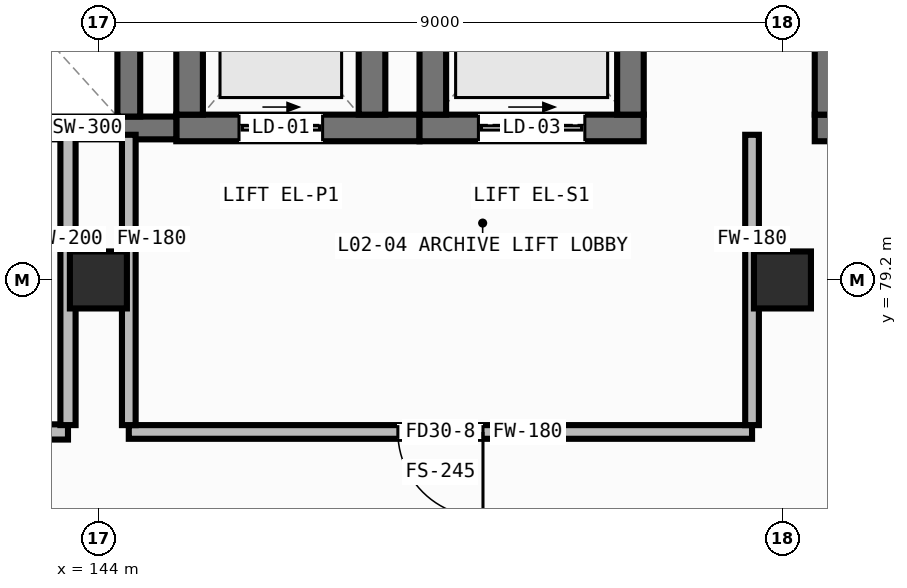
"""IFC4 building model, lengths in metres.
Left out: names, types, materials, properties, quantities, classifications, styles, units other than length and angle.
Written with IfcOpenShell. Run it as: python <this file> out.ifc"""

import sys

from ifc_helpers import new_model, si_unit, direction, frame, frame_2d, origin, origin_2d, place, context, subcontext, project, spatial, rectangle, hollow_rectangle, extrude, element, fill, save


model = new_model("IFC4")
c1 = context("Model", 3, precision=1e-05, world=origin(), true_north=direction((0.0, 1.0)))
c2 = subcontext(c1, "Body", "Model", "MODEL_VIEW")
j1 = project(units=[si_unit("LENGTHUNIT", "METRE"), si_unit("PLANEANGLEUNIT", "RADIAN")], contexts=[c1])
p1 = place(None, origin())
s1 = spatial("IfcSite", under=j1, at=p1, CompositionType="ELEMENT")
p2 = place(p1, origin())
s2 = spatial("IfcBuilding", under=s1, at=p2, CompositionType="ELEMENT")
p3 = place(p2, frame((0.0, 0.0, 4.8)))
s3 = spatial("IfcBuildingStorey", under=s2, at=p3, CompositionType="ELEMENT", Elevation=4.8)
for number, where, z_axis, x_axis in (
    (1, (144.0, 79.2, 0.0), (0.0, 0.0, 1.0), (1.0, 0.0, 0.0)),
    (2, (153.0, 79.2, 0.0), (0.0, 0.0, 1.0), (1.0, 0.0, 0.0)),
):
    element("IfcColumn", number, at=place(p3, frame(where, z_axis=z_axis, x_axis=x_axis)), inside=s3, PredefinedType="COLUMN", context=c2, shape_type="SweptSolid", body=[
        extrude(hollow_rectangle(XDim=0.75, YDim=0.75, WallThickness=0.032, at=origin_2d()), origin(), (0.0, 0.0, 1.0), 4.0),
    ])
p4 = place(p3, frame((153.425, 81.2, 0.0), z_axis=(0.0, 0.0, 1.0), x_axis=(1.0, 0.0, 0.0)))
e3 = element("IfcWall", 3, at=p4, inside=s3, PredefinedType="SHEAR", context=c2, shape_type="SweptSolid", body=[
    extrude(rectangle(XDim=8.15, YDim=0.35, at=frame_2d((4.075, 0.0))), origin(), (0.0, 0.0, 1.0), 3.755),
])
p5 = place(p4, frame((0.525, 0.0, 0.0)))
e4 = element("IfcOpeningElement", 4, at=p5, cuts=e3, PredefinedType="OPENING", context=c2, shape_type="SweptSolid", body=[
    extrude(rectangle(XDim=1.15, YDim=2.1, at=frame_2d((0.575, 1.05))), frame((0.0, 0.187, 0.0), z_axis=(0.0, -1.0, 0.0), x_axis=(1.0, 0.0, 0.0)), (0.0, 0.0, 1.0), 0.374),
])
p6 = place(p3, frame((153.6, 81.375, 0.0), z_axis=(0.0, 0.0, 1.0), x_axis=(0.0, 1.0, 0.0)))
e5 = element("IfcWall", 5, at=p6, inside=s3, PredefinedType="SHEAR", context=c2, shape_type="SweptSolid", body=[
    extrude(rectangle(XDim=3.55, YDim=0.35, at=frame_2d((1.775, 0.0))), origin(), (0.0, 0.0, 1.0), 3.755),
])
p7 = place(p3, frame((145.025, 81.2, 0.0), z_axis=(0.0, 0.0, 1.0), x_axis=(1.0, 0.0, 0.0)))
e6 = element("IfcWall", 6, at=p7, inside=s3, PredefinedType="SHEAR", context=c2, shape_type="SweptSolid", body=[
    extrude(rectangle(XDim=3.2, YDim=0.35, at=frame_2d((1.6, 0.0))), origin(), (0.0, 0.0, 1.0), 3.755),
])
p8 = place(p7, frame((0.825, 0.0, 0.0)))
e7 = element("IfcOpeningElement", 7, at=p8, cuts=e6, PredefinedType="OPENING", context=c2, shape_type="SweptSolid", body=[
    extrude(rectangle(XDim=1.1, YDim=2.1, at=frame_2d((0.55, 1.05))), frame((0.0, 0.187, 0.0), z_axis=(0.0, -1.0, 0.0), x_axis=(1.0, 0.0, 0.0)), (0.0, 0.0, 1.0), 0.374),
])
for number, where, z_axis, x_axis in (
    (8, (145.2, 81.375, 0.0), (0.0, 0.0, 1.0), (0.0, 1.0, 0.0)),
    (9, (147.6, 81.375, 0.0), (0.0, 0.0, 1.0), (0.0, 1.0, 0.0)),
):
    element("IfcWall", number, at=place(p3, frame(where, z_axis=z_axis, x_axis=x_axis)), inside=s3, PredefinedType="SHEAR", context=c2, shape_type="SweptSolid", body=[
        extrude(rectangle(XDim=2.45, YDim=0.35, at=frame_2d((1.225, 0.0))), origin(), (0.0, 0.0, 1.0), 3.755),
    ])
p9 = place(p3, frame((148.225, 81.2, 0.0), z_axis=(0.0, 0.0, 1.0), x_axis=(1.0, 0.0, 0.0)))
e10 = element("IfcWall", 10, at=p9, inside=s3, PredefinedType="SHEAR", context=c2, shape_type="SweptSolid", body=[
    extrude(rectangle(XDim=2.95, YDim=0.35, at=frame_2d((1.475, 0.0))), origin(), (0.0, 0.0, 1.0), 3.755),
])
p10 = place(p9, frame((0.775, 0.0, 0.0)))
e11 = element("IfcOpeningElement", 11, at=p10, cuts=e10, PredefinedType="OPENING", context=c2, shape_type="SweptSolid", body=[
    extrude(rectangle(XDim=1.4, YDim=2.15, at=frame_2d((0.7, 1.075))), frame((0.0, 0.187, 0.0), z_axis=(0.0, -1.0, 0.0), x_axis=(1.0, 0.0, 0.0)), (0.0, 0.0, 1.0), 0.374),
])
for number, where, z_axis, x_axis in (
    (12, (148.4, 81.375, 0.0), (0.0, 0.0, 1.0), (0.0, 1.0, 0.0)),
    (13, (151.0, 81.375, 0.0), (0.0, 0.0, 1.0), (0.0, 1.0, 0.0)),
):
    element("IfcWall", number, at=place(p3, frame(where, z_axis=z_axis, x_axis=x_axis)), inside=s3, PredefinedType="SHEAR", context=c2, shape_type="SweptSolid", body=[
        extrude(rectangle(XDim=3.05, YDim=0.35, at=frame_2d((1.525, 0.0))), origin(), (0.0, 0.0, 1.0), 3.755),
    ])
p11 = place(p3, frame((141.775, 81.2, 0.0), z_axis=(0.0, 0.0, 1.0), x_axis=(1.0, 0.0, 0.0)))
e14 = element("IfcWall", 14, at=p11, inside=s3, PredefinedType="SHEAR", context=c2, shape_type="SweptSolid", body=[
    extrude(rectangle(XDim=3.25, YDim=0.3, at=frame_2d((1.625, 0.0))), origin(), (0.0, 0.0, 1.0), 3.755),
])
p12 = place(p3, frame((144.4, 81.35, 0.0), z_axis=(0.0, 0.0, 1.0), x_axis=(0.0, 1.0, 0.0)))
e15 = element("IfcWall", 15, at=p12, inside=s3, PredefinedType="SHEAR", context=c2, shape_type="SweptSolid", body=[
    extrude(rectangle(XDim=2.1, YDim=0.3, at=frame_2d((1.05, 0.0))), origin(), (0.0, 0.0, 1.0), 3.755),
])
p13 = place(p3, frame((135.8, 77.2, 0.0), z_axis=(0.0, 0.0, 1.0), x_axis=(1.0, 0.0, 0.0)))
e16 = element("IfcWall", 16, at=p13, inside=s3, PredefinedType="PARTITIONING", context=c2, shape_type="SweptSolid", body=[
    extrude(rectangle(XDim=7.8, YDim=0.2, at=frame_2d((3.9, 0.0))), origin(), (0.0, 0.0, 1.0), 3.755),
])
p14 = place(p13, frame((3.1, 0.0, 0.0)))
e17 = element("IfcOpeningElement", 17, at=p14, cuts=e16, PredefinedType="OPENING", context=c2, shape_type="SweptSolid", body=[
    extrude(rectangle(XDim=1.2, YDim=2.1, at=frame_2d((0.6, 1.05))), frame((0.0, 0.112, 0.0), z_axis=(0.0, -1.0, 0.0), x_axis=(1.0, 0.0, 0.0)), (0.0, 0.0, 1.0), 0.224),
])
p15 = place(p3, frame((143.6, 77.29, 0.0), z_axis=(0.0, 0.0, 1.0), x_axis=(0.0, 1.0, 0.0)))
e18 = element("IfcWall", 18, at=p15, inside=s3, PredefinedType="PARTITIONING", context=c2, shape_type="SweptSolid", body=[
    extrude(rectangle(XDim=3.82, YDim=0.2, at=frame_2d((1.91, 0.0))), origin(), (0.0, 0.0, 1.0), 3.755),
])
p16 = place(p3, frame((144.4, 77.2, 0.0), z_axis=(0.0, 0.0, 1.0), x_axis=(1.0, 0.0, 0.0)))
e19 = element("IfcWall", 19, at=p16, inside=s3, PredefinedType="PARTITIONING", context=c2, shape_type="SweptSolid", body=[
    extrude(rectangle(XDim=8.2, YDim=0.18, at=frame_2d((4.1, 0.0))), origin(), (0.0, 0.0, 1.0), 3.755),
])
p17 = place(p16, frame((3.54, 0.0, 0.0)))
e20 = element("IfcOpeningElement", 20, at=p17, cuts=e19, PredefinedType="OPENING", context=c2, shape_type="SweptSolid", body=[
    extrude(rectangle(XDim=1.12, YDim=2.08, at=frame_2d((0.56, 1.04))), frame((0.0, 0.102, 0.0), z_axis=(0.0, -1.0, 0.0), x_axis=(1.0, 0.0, 0.0)), (0.0, 0.0, 1.0), 0.204),
])
for number, where, z_axis, x_axis in (
    (21, (144.4, 77.29, 0.0), (0.0, 0.0, 1.0), (0.0, 1.0, 0.0)),
    (22, (152.6, 77.29, 0.0), (0.0, 0.0, 1.0), (0.0, 1.0, 0.0)),
):
    element("IfcWall", number, at=place(p3, frame(where, z_axis=z_axis, x_axis=x_axis)), inside=s3, PredefinedType="PARTITIONING", context=c2, shape_type="SweptSolid", body=[
        extrude(rectangle(XDim=3.82, YDim=0.18, at=frame_2d((1.91, 0.0))), origin(), (0.0, 0.0, 1.0), 3.755),
    ])
p18 = place(p8, origin())
e23 = element("IfcDoor", 23, at=p18, inside=s3, OperationType="SLIDING_TO_LEFT", PredefinedType="DOOR", context=c2, shape_type="SweptSolid", body=[
    extrude(rectangle(XDim=1.1, YDim=2.1, at=frame_2d((0.55, 1.05))), frame((0.0, 0.025, 0.0), z_axis=(0.0, -1.0, 0.0), x_axis=(1.0, 0.0, 0.0)), (0.0, 0.0, 1.0), 0.05),
])
fill(e7, e23)
p19 = place(p10, origin())
e24 = element("IfcDoor", 24, at=p19, inside=s3, OperationType="SLIDING_TO_LEFT", PredefinedType="DOOR", context=c2, shape_type="SweptSolid", body=[
    extrude(rectangle(XDim=1.4, YDim=2.15, at=frame_2d((0.7, 1.075))), frame((0.0, 0.025, 0.0), z_axis=(0.0, -1.0, 0.0), x_axis=(1.0, 0.0, 0.0)), (0.0, 0.0, 1.0), 0.05),
])
fill(e11, e24)
p20 = place(p17, frame((1.12, 0.0, 0.0), z_axis=(0.0, 0.0, 1.0), x_axis=(-1.0, 0.0, 0.0)))
e25 = element("IfcDoor", 25, at=p20, inside=s3, OperationType="SINGLE_SWING_LEFT", PredefinedType="DOOR", context=c2, shape_type="SweptSolid", body=[
    extrude(rectangle(XDim=1.12, YDim=2.08, at=frame_2d((0.56, 1.04))), frame((0.0, 0.025, 0.0), z_axis=(0.0, -1.0, 0.0), x_axis=(1.0, 0.0, 0.0)), (0.0, 0.0, 1.0), 0.05),
])
fill(e20, e25)
save(model, sys.argv[1])
